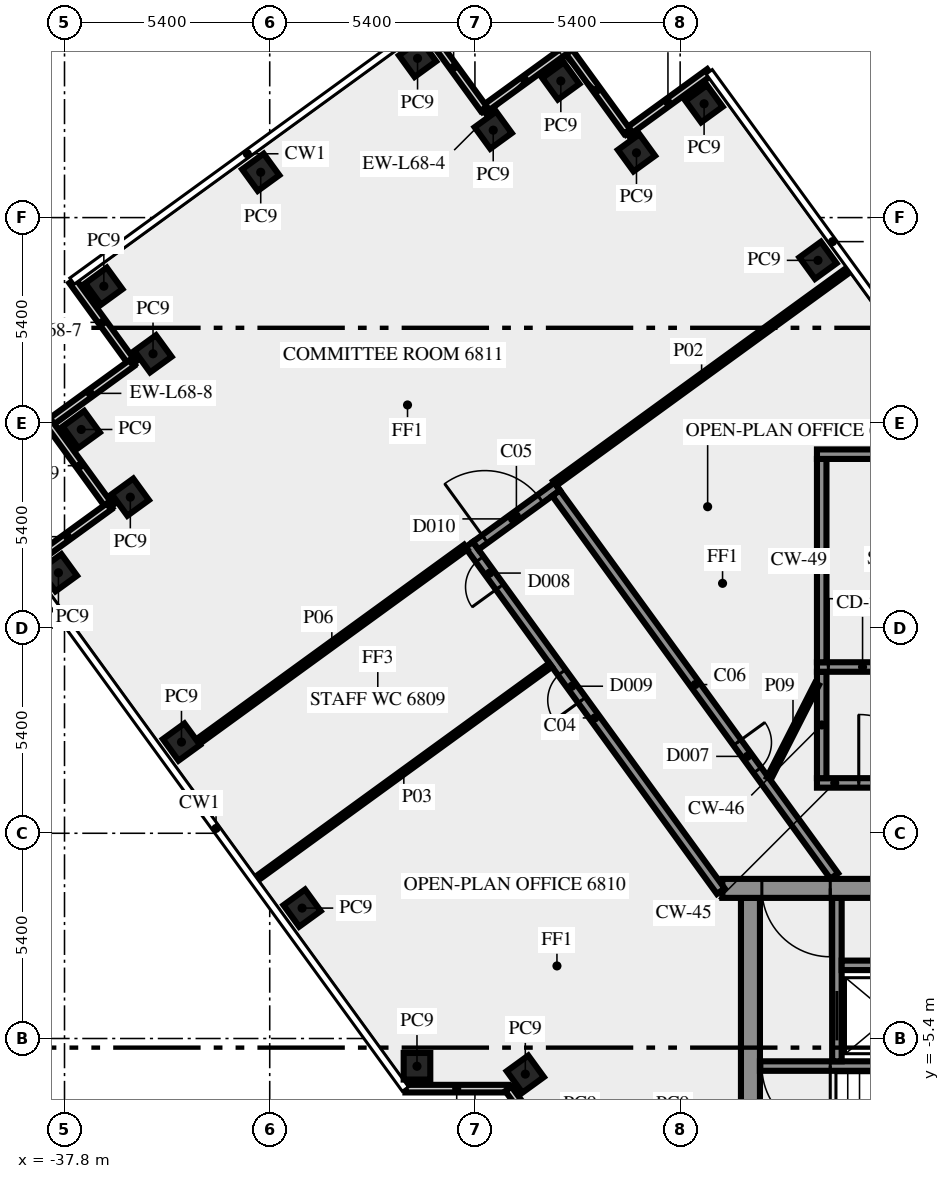
"""IFC4 building model, lengths in metres.
Left out: names, types, materials, properties, quantities, classifications, styles, units other than length and angle.
Written with IfcOpenShell. Run it as: python <this file> out.ifc"""

import sys

from ifc_helpers import new_model, si_unit, direction, frame, frame_2d, origin, origin_2d, place, context, subcontext, project, spatial, rectangle, extrude, element, fill, save


model = new_model("IFC4")
c1 = context("Model", 3, precision=1e-05, world=origin(), true_north=direction((0.0, 1.0)))
c2 = subcontext(c1, "Body", "Model", "MODEL_VIEW")
j1 = project(units=[si_unit("LENGTHUNIT", "METRE"), si_unit("PLANEANGLEUNIT", "RADIAN")], contexts=[c1])
p1 = place(None, origin())
s1 = spatial("IfcSite", under=j1, at=p1, CompositionType="ELEMENT")
p2 = place(p1, origin())
s2 = spatial("IfcBuilding", under=s1, at=p2, CompositionType="ELEMENT")
p3 = place(p2, frame((0.0, 0.0, 293.0)))
s3 = spatial("IfcBuildingStorey", under=s2, at=p3, CompositionType="ELEMENT", Elevation=293.0)
for number, where, z_axis, x_axis in (
    (1, (-17.974, 15.075, 0.0), (0.0, 0.0, 1.0), (-0.588, 0.809, 0.0)),
    (2, (-20.97, 19.195, 0.0), (0.0, 0.0, 1.0), (-0.588, 0.809, 0.0)),
    (3, (-22.749, 17.904, 0.0), (0.0, 0.0, 1.0), (-0.588, 0.809, 0.0)),
    (4, (-24.74, 19.795, 0.0), (0.0, 0.0, 1.0), (-0.588, 0.809, 0.0)),
    (5, (-26.519, 18.5, 0.0), (0.0, 0.0, 1.0), (-0.588, 0.809, 0.0)),
    (6, (-28.51, 20.39, 0.0), (0.0, 0.0, 1.0), (-0.809, -0.588, 0.0)),
    (7, (-32.637, 17.393, 0.0), (0.0, 0.0, 1.0), (-0.809, -0.588, 0.0)),
    (8, (-36.765, 14.395, 0.0), (0.0, 0.0, 1.0), (0.588, -0.809, 0.0)),
    (9, (-35.471, 12.616, 0.0), (0.0, 0.0, 1.0), (-0.809, -0.588, 0.0)),
    (10, (-37.36, 10.625, 0.0), (0.0, 0.0, 1.0), (0.588, -0.809, 0.0)),
    (11, (-36.068, 8.844, 0.0), (0.0, 0.0, 1.0), (0.588, -0.809, 0.0)),
    (12, (-37.96, 6.855, 0.0), (0.0, 0.0, 1.0), (0.588, -0.809, 0.0)),
    (13, (-34.722, 2.4, 0.0), (0.0, 0.0, 1.0), (0.588, -0.809, 0.0)),
    (14, (-31.548, -1.969, 0.0), (0.0, 0.0, 1.0), (0.588, -0.809, 0.0)),
    (15, (-28.525, -6.13, 0.0), (0.0, 0.0, 1.0), (1.0, 0.0, 0.0)),
    (16, (-25.674, -6.337, 0.0), (0.0, 0.0, 1.0), (0.588, -0.809, 0.0)),
):
    element("IfcColumn", number, at=place(p3, frame(where, z_axis=z_axis, x_axis=x_axis)), inside=s3, PredefinedType="COLUMN", context=c2, shape_type="SweptSolid", body=[
        extrude(rectangle(XDim=0.7, YDim=0.7, at=origin_2d()), origin(), (0.0, 0.0, 1.0), 3.65),
    ])
for number, where, z_axis, x_axis in (
    (17, (-20.829, 20.025, 0.0), (0.0, 0.0, 1.0), (-0.809, -0.588, 0.0)),
    (18, (-22.996, 18.466, 0.0), (0.0, 0.0, 1.0), (-0.588, 0.809, 0.0)),
):
    element("IfcWall", number, at=place(p3, frame(where, z_axis=z_axis, x_axis=x_axis)), inside=s3, PredefinedType="SOLIDWALL", context=c2, shape_type="SweptSolid", body=[
        extrude(rectangle(XDim=2.7, YDim=0.2, at=frame_2d((1.35, 0.0))), origin(), (0.0, 0.0, 1.0), 3.65),
    ])
for number, where, z_axis, x_axis in (
    (19, (-24.6, 20.623, 0.0), (0.0, 0.0, 1.0), (-0.809, -0.588, 0.0)),
    (20, (-26.768, 19.063, 0.0), (0.0, 0.0, 1.0), (-0.588, 0.809, 0.0)),
):
    element("IfcWall", number, at=place(p3, frame(where, z_axis=z_axis, x_axis=x_axis)), inside=s3, PredefinedType="SOLIDWALL", context=c2, shape_type="SweptSolid", body=[
        extrude(rectangle(XDim=2.7, YDim=0.2, at=frame_2d((1.35, 0.0))), origin(), (0.0, 0.0, 1.0), 3.65),
    ])
for number, where, z_axis, x_axis in (
    (21, (-37.592, 14.536, 0.0), (0.0, 0.0, 1.0), (0.588, -0.809, 0.0)),
    (22, (-36.032, 12.369, 0.0), (0.0, 0.0, 1.0), (-0.809, -0.588, 0.0)),
    (23, (-38.189, 10.765, 0.0), (0.0, 0.0, 1.0), (0.588, -0.809, 0.0)),
    (24, (-36.629, 8.597, 0.0), (0.0, 0.0, 1.0), (-0.809, -0.588, 0.0)),
    (25, (-28.83, -6.719, 0.0), (0.0, 0.0, 1.0), (1.0, 0.0, 0.0)),
):
    element("IfcWall", number, at=place(p3, frame(where, z_axis=z_axis, x_axis=x_axis)), inside=s3, PredefinedType="SOLIDWALL", context=c2, shape_type="SweptSolid", body=[
        extrude(rectangle(XDim=2.7, YDim=0.2, at=frame_2d((1.35, 0.0))), origin(), (0.0, 0.0, 1.0), 3.65),
    ])
p4 = place(p3, frame((-26.12, -6.724, 0.0), z_axis=(0.0, 0.0, 1.0), x_axis=(0.587720002413, -0.809064397168, 0.0)))
e26 = element("IfcWall", 26, at=p4, inside=s3, PredefinedType="SOLIDWALL", context=c2, shape_type="SweptSolid", body=[
    extrude(rectangle(XDim=2.7, YDim=0.2, at=frame_2d((1.35, 0.0))), origin(), (0.0, 0.0, 1.0), 3.65),
])
p5 = place(p3, frame((-19.75, -10.5, 0.0), z_axis=(0.0, 0.0, 1.0), x_axis=(0.0, 1.0, 0.0)))
e27 = element("IfcWall", 27, at=p5, inside=s3, PredefinedType="SHEAR", context=c2, shape_type="SweptSolid", body=[
    extrude(rectangle(XDim=8.8, YDim=0.5, at=frame_2d((4.4, 0.0))), origin(), (0.0, 0.0, 1.0), 3.65),
])
p6 = place(p3, frame((-11.45, -6.125, 0.0), z_axis=(0.0, 0.0, 1.0), x_axis=(-1.0, 0.0, 0.0)))
e28 = element("IfcWall", 28, at=p6, inside=s3, PredefinedType="SHEAR", context=c2, shape_type="SweptSolid", body=[
    extrude(rectangle(XDim=8.05, YDim=0.25, at=frame_2d((4.025, 0.0))), origin(), (0.0, 0.0, 1.0), 3.65),
])
p7 = place(p6, frame((6.2, 0.0, 0.0)))
e29 = element("IfcOpeningElement", 29, at=p7, cuts=e28, PredefinedType="OPENING", context=c2, shape_type="SweptSolid", body=[
    extrude(rectangle(XDim=1.8, YDim=2.1, at=frame_2d((0.9, 1.05))), frame((0.0, 0.135, 0.0), z_axis=(0.0, -1.0, 0.0), x_axis=(1.0, 0.0, 0.0)), (0.0, 0.0, 1.0), 0.27),
])
p8 = place(p3, frame((-17.475, -6.0, 0.0), z_axis=(0.0, 0.0, 1.0), x_axis=(0.0, 1.0, 0.0)))
e30 = element("IfcWall", 30, at=p8, inside=s3, PredefinedType="SHEAR", context=c2, shape_type="SweptSolid", body=[
    extrude(rectangle(XDim=4.3, YDim=0.25, at=frame_2d((2.15, 0.0))), origin(), (0.0, 0.0, 1.0), 3.65),
])
p9 = place(p8, frame((0.55, 0.0, 0.0)))
e31 = element("IfcOpeningElement", 31, at=p9, cuts=e30, PredefinedType="OPENING", context=c2, shape_type="SweptSolid", body=[
    extrude(rectangle(XDim=1.3, YDim=2.1, at=frame_2d((0.65, 1.05))), frame((0.0, 0.135, 0.0), z_axis=(0.0, -1.0, 0.0), x_axis=(1.0, 0.0, 0.0)), (0.0, 0.0, 1.0), 0.27),
])
p10 = place(p3, frame((-17.35, -3.475, 0.0), z_axis=(0.0, 0.0, 1.0), x_axis=(1.0, 0.0, 0.0)))
e32 = element("IfcWall", 32, at=p10, inside=s3, PredefinedType="SHEAR", context=c2, shape_type="SweptSolid", body=[
    extrude(rectangle(XDim=3.0, YDim=0.25, at=frame_2d((1.5, 0.0))), origin(), (0.0, 0.0, 1.0), 3.65),
])
p11 = place(p3, frame((20.49, -1.45, 0.0), z_axis=(0.0, 0.0, 1.0), x_axis=(-1.0, 0.0, 0.0)))
e33 = element("IfcWall", 33, at=p11, inside=s3, PredefinedType="SHEAR", context=c2, shape_type="SweptSolid", body=[
    extrude(rectangle(XDim=40.98, YDim=0.5, at=frame_2d((20.49, 0.0))), origin(), (0.0, 0.0, 1.0), 3.65),
])
p12 = place(p11, frame((38.14, 0.0, 0.0)))
e34 = element("IfcOpeningElement", 34, at=p12, cuts=e33, PredefinedType="OPENING", context=c2, shape_type="SweptSolid", body=[
    extrude(rectangle(XDim=1.8, YDim=2.1, at=frame_2d((0.9, 1.05))), frame((0.0, 0.26, 0.0), z_axis=(0.0, -1.0, 0.0), x_axis=(1.0, 0.0, 0.0)), (0.0, 0.0, 1.0), 0.52),
])
p13 = place(p11, frame((35.89, 0.0, 0.0)))
e35 = element("IfcOpeningElement", 35, at=p13, cuts=e33, PredefinedType="OPENING", context=c2, shape_type="SweptSolid", body=[
    extrude(rectangle(XDim=0.9, YDim=2.1, at=frame_2d((0.45, 1.05))), frame((0.0, 0.26, 0.0), z_axis=(0.0, -1.0, 0.0), x_axis=(1.0, 0.0, 0.0)), (0.0, 0.0, 1.0), 0.52),
])
p14 = place(p11, frame((32.94, 0.0, 0.0)))
e36 = element("IfcOpeningElement", 36, at=p14, cuts=e33, PredefinedType="OPENING", context=c2, shape_type="SweptSolid", body=[
    extrude(rectangle(XDim=0.9, YDim=2.1, at=frame_2d((0.45, 1.05))), frame((0.0, 0.26, 0.0), z_axis=(0.0, -1.0, 0.0), x_axis=(1.0, 0.0, 0.0)), (0.0, 0.0, 1.0), 0.52),
])
p15 = place(p11, frame((31.015, 0.0, 0.0)))
e37 = element("IfcOpeningElement", 37, at=p15, cuts=e33, PredefinedType="OPENING", context=c2, shape_type="SweptSolid", body=[
    extrude(rectangle(XDim=0.8, YDim=2.1, at=frame_2d((0.4, 1.05))), frame((0.0, 0.26, 0.0), z_axis=(0.0, -1.0, 0.0), x_axis=(1.0, 0.0, 0.0)), (0.0, 0.0, 1.0), 0.52),
])
p16 = place(p11, frame((24.765, 0.0, 0.0)))
e38 = element("IfcOpeningElement", 38, at=p16, cuts=e33, PredefinedType="OPENING", context=c2, shape_type="SweptSolid", body=[
    extrude(rectangle(XDim=0.8, YDim=2.1, at=frame_2d((0.4, 1.05))), frame((0.0, 0.26, 0.0), z_axis=(0.0, -1.0, 0.0), x_axis=(1.0, 0.0, 0.0)), (0.0, 0.0, 1.0), 0.52),
])
p17 = place(p11, frame((21.765, 0.0, 0.0)))
e39 = element("IfcOpeningElement", 39, at=p17, cuts=e33, PredefinedType="OPENING", context=c2, shape_type="SweptSolid", body=[
    extrude(rectangle(XDim=2.0, YDim=2.1, at=frame_2d((1.0, 1.05))), frame((0.0, 0.26, 0.0), z_axis=(0.0, -1.0, 0.0), x_axis=(1.0, 0.0, 0.0)), (0.0, 0.0, 1.0), 0.52),
])
p18 = place(p11, frame((15.202, 0.0, 0.0)))
e40 = element("IfcOpeningElement", 40, at=p18, cuts=e33, PredefinedType="OPENING", context=c2, shape_type="SweptSolid", body=[
    extrude(rectangle(XDim=0.9, YDim=2.1, at=frame_2d((0.45, 1.05))), frame((0.0, 0.26, 0.0), z_axis=(0.0, -1.0, 0.0), x_axis=(1.0, 0.0, 0.0)), (0.0, 0.0, 1.0), 0.52),
])
p19 = place(p11, frame((13.54, 0.0, 0.0)))
e41 = element("IfcOpeningElement", 41, at=p19, cuts=e33, PredefinedType="OPENING", context=c2, shape_type="SweptSolid", body=[
    extrude(rectangle(XDim=0.9, YDim=2.1, at=frame_2d((0.45, 1.05))), frame((0.0, 0.26, 0.0), z_axis=(0.0, -1.0, 0.0), x_axis=(1.0, 0.0, 0.0)), (0.0, 0.0, 1.0), 0.52),
])
p20 = place(p11, frame((11.64, 0.0, 0.0)))
e42 = element("IfcOpeningElement", 42, at=p20, cuts=e33, PredefinedType="OPENING", context=c2, shape_type="SweptSolid", body=[
    extrude(rectangle(XDim=0.9, YDim=2.1, at=frame_2d((0.45, 1.05))), frame((0.0, 0.26, 0.0), z_axis=(0.0, -1.0, 0.0), x_axis=(1.0, 0.0, 0.0)), (0.0, 0.0, 1.0), 0.52),
])
p21 = place(p11, frame((9.577, 0.0, 0.0)))
e43 = element("IfcOpeningElement", 43, at=p21, cuts=e33, PredefinedType="OPENING", context=c2, shape_type="SweptSolid", body=[
    extrude(rectangle(XDim=0.9, YDim=2.1, at=frame_2d((0.45, 1.05))), frame((0.0, 0.26, 0.0), z_axis=(0.0, -1.0, 0.0), x_axis=(1.0, 0.0, 0.0)), (0.0, 0.0, 1.0), 0.52),
])
p22 = place(p11, frame((7.14, 0.0, 0.0)))
e44 = element("IfcOpeningElement", 44, at=p22, cuts=e33, PredefinedType="OPENING", context=c2, shape_type="SweptSolid", body=[
    extrude(rectangle(XDim=0.9, YDim=2.1, at=frame_2d((0.45, 1.05))), frame((0.0, 0.26, 0.0), z_axis=(0.0, -1.0, 0.0), x_axis=(1.0, 0.0, 0.0)), (0.0, 0.0, 1.0), 0.52),
])
p23 = place(p11, frame((5.028, 0.0, 0.0)))
e45 = element("IfcOpeningElement", 45, at=p23, cuts=e33, PredefinedType="OPENING", context=c2, shape_type="SweptSolid", body=[
    extrude(rectangle(XDim=0.8, YDim=2.1, at=frame_2d((0.4, 1.05))), frame((0.0, 0.26, 0.0), z_axis=(0.0, -1.0, 0.0), x_axis=(1.0, 0.0, 0.0)), (0.0, 0.0, 1.0), 0.52),
])
p24 = place(p11, frame((3.452, 0.0, 0.0)))
e46 = element("IfcOpeningElement", 46, at=p24, cuts=e33, PredefinedType="OPENING", context=c2, shape_type="SweptSolid", body=[
    extrude(rectangle(XDim=0.8, YDim=2.1, at=frame_2d((0.4, 1.05))), frame((0.0, 0.26, 0.0), z_axis=(0.0, -1.0, 0.0), x_axis=(1.0, 0.0, 0.0)), (0.0, 0.0, 1.0), 0.52),
])
p25 = place(p11, frame((1.04, 0.0, 0.0)))
e47 = element("IfcOpeningElement", 47, at=p25, cuts=e33, PredefinedType="OPENING", context=c2, shape_type="SweptSolid", body=[
    extrude(rectangle(XDim=1.8, YDim=2.1, at=frame_2d((0.9, 1.05))), frame((0.0, 0.26, 0.0), z_axis=(0.0, -1.0, 0.0), x_axis=(1.0, 0.0, 0.0)), (0.0, 0.0, 1.0), 0.52),
])
p26 = place(p3, frame((-18.0, 1.325, 0.0), z_axis=(0.0, 0.0, 1.0), x_axis=(1.0, 0.0, 0.0)))
e48 = element("IfcWall", 48, at=p26, inside=s3, PredefinedType="SHEAR", context=c2, shape_type="SweptSolid", body=[
    extrude(rectangle(XDim=3.9, YDim=0.25, at=frame_2d((1.95, 0.0))), origin(), (0.0, 0.0, 1.0), 3.65),
])
p27 = place(p26, frame((1.1, 0.0, 0.0)))
e49 = element("IfcOpeningElement", 49, at=p27, cuts=e48, PredefinedType="OPENING", context=c2, shape_type="SweptSolid", body=[
    extrude(rectangle(XDim=1.8, YDim=2.1, at=frame_2d((0.9, 1.05))), frame((0.0, 0.135, 0.0), z_axis=(0.0, -1.0, 0.0), x_axis=(1.0, 0.0, 0.0)), (0.0, 0.0, 1.0), 0.27),
])
p28 = place(p3, frame((-17.875, 1.45, 0.0), z_axis=(0.0, 0.0, 1.0), x_axis=(0.0, 1.0, 0.0)))
e50 = element("IfcWall", 50, at=p28, inside=s3, PredefinedType="SHEAR", context=c2, shape_type="SweptSolid", body=[
    extrude(rectangle(XDim=2.8, YDim=0.25, at=frame_2d((1.4, 0.0))), origin(), (0.0, 0.0, 1.0), 3.65),
])
p29 = place(p3, frame((-18.0, 4.375, 0.0), z_axis=(0.0, 0.0, 1.0), x_axis=(1.0, 0.0, 0.0)))
e51 = element("IfcWall", 51, at=p29, inside=s3, PredefinedType="SHEAR", context=c2, shape_type="SweptSolid", body=[
    extrude(rectangle(XDim=10.5, YDim=0.25, at=frame_2d((5.25, 0.0))), origin(), (0.0, 0.0, 1.0), 3.65),
])
p30 = place(p29, frame((0.3, 0.0, 0.0)))
e52 = element("IfcOpeningElement", 52, at=p30, cuts=e51, PredefinedType="OPENING", context=c2, shape_type="SweptSolid", body=[
    extrude(rectangle(XDim=1.8, YDim=2.1, at=frame_2d((0.9, 1.05))), frame((0.0, 0.135, 0.0), z_axis=(0.0, -1.0, 0.0), x_axis=(1.0, 0.0, 0.0)), (0.0, 0.0, 1.0), 0.27),
])
p31 = place(p3, frame((-17.875, 4.5, 0.0), z_axis=(0.0, 0.0, 1.0), x_axis=(0.0, 1.0, 0.0)))
e53 = element("IfcWall", 53, at=p31, inside=s3, PredefinedType="SHEAR", context=c2, shape_type="SweptSolid", body=[
    extrude(rectangle(XDim=5.35, YDim=0.25, at=frame_2d((2.675, 0.0))), origin(), (0.0, 0.0, 1.0), 3.65),
])
p32 = place(p3, frame((-18.0, 9.975, 0.0), z_axis=(0.0, 0.0, 1.0), x_axis=(1.0, 0.0, 0.0)))
e54 = element("IfcWall", 54, at=p32, inside=s3, PredefinedType="SHEAR", context=c2, shape_type="SweptSolid", body=[
    extrude(rectangle(XDim=10.5, YDim=0.25, at=frame_2d((5.25, 0.0))), origin(), (0.0, 0.0, 1.0), 3.65),
])
p33 = place(p32, frame((4.5, 0.0, 1.0)))
e55 = element("IfcOpeningElement", 55, at=p33, cuts=e54, PredefinedType="OPENING", context=c2, shape_type="SweptSolid", body=[
    extrude(rectangle(XDim=1.2, YDim=1.2, at=frame_2d((0.6, 0.6))), frame((0.0, 0.135, 0.0), z_axis=(0.0, -1.0, 0.0), x_axis=(1.0, 0.0, 0.0)), (0.0, 0.0, 1.0), 0.27),
])
p34 = place(p3, frame((-20.531, -1.523, 0.0), z_axis=(0.0, 0.0, 1.0), x_axis=(-0.587782646447, 0.809018887626, 0.0)))
e56 = element("IfcWall", 56, at=p34, inside=s3, PredefinedType="SOLIDWALL", context=c2, shape_type="SweptSolid", body=[
    extrude(rectangle(XDim=11.27, YDim=0.25, at=frame_2d((5.635, 0.0))), origin(), (0.0, 0.0, 1.0), 3.65),
])
p35 = place(p34, frame((6.216, 0.0, 0.0)))
e57 = element("IfcOpeningElement", 57, at=p35, cuts=e56, PredefinedType="OPENING", context=c2, shape_type="SweptSolid", body=[
    extrude(rectangle(XDim=0.9, YDim=2.1, at=frame_2d((0.45, 1.05))), frame((0.0, 0.135, 0.0), z_axis=(0.0, -1.0, 0.0), x_axis=(1.0, 0.0, 0.0)), (0.0, 0.0, 1.0), 0.27),
])
p36 = place(p34, frame((9.896, 0.0, 0.0)))
e58 = element("IfcOpeningElement", 58, at=p36, cuts=e56, PredefinedType="OPENING", context=c2, shape_type="SweptSolid", body=[
    extrude(rectangle(XDim=0.9, YDim=2.1, at=frame_2d((0.45, 1.05))), frame((0.0, 0.135, 0.0), z_axis=(0.0, -1.0, 0.0), x_axis=(1.0, 0.0, 0.0)), (0.0, 0.0, 1.0), 0.27),
])
p37 = place(p3, frame((-26.981, 7.567, 0.0), z_axis=(0.0, 0.0, 1.0), x_axis=(0.809038743598, 0.587755315891, 0.0)))
e59 = element("IfcWall", 59, at=p37, inside=s3, PredefinedType="SOLIDWALL", context=c2, shape_type="SweptSolid", body=[
    extrude(rectangle(XDim=2.65, YDim=0.25, at=frame_2d((1.325, 0.0))), origin(), (0.0, 0.0, 1.0), 3.65),
])
p38 = place(p37, frame((0.3, 0.0, 0.0)))
e60 = element("IfcOpeningElement", 60, at=p38, cuts=e59, PredefinedType="OPENING", context=c2, shape_type="SweptSolid", body=[
    extrude(rectangle(XDim=1.8, YDim=2.1, at=frame_2d((0.9, 1.05))), frame((0.0, 0.135, 0.0), z_axis=(0.0, -1.0, 0.0), x_axis=(1.0, 0.0, 0.0)), (0.0, 0.0, 1.0), 0.27),
])
p39 = place(p3, frame((-24.865, 8.95, 0.0), z_axis=(0.0, 0.0, 1.0), x_axis=(0.587791617212, -0.809012369952, 0.0)))
e61 = element("IfcWall", 61, at=p39, inside=s3, PredefinedType="SOLIDWALL", context=c2, shape_type="SweptSolid", body=[
    extrude(rectangle(XDim=12.453, YDim=0.25, at=frame_2d((6.227, 0.0))), origin(), (0.0, 0.0, 1.0), 3.65),
])
p40 = place(p39, frame((8.112, 0.0, 0.0)))
e62 = element("IfcOpeningElement", 62, at=p40, cuts=e61, PredefinedType="OPENING", context=c2, shape_type="SweptSolid", body=[
    extrude(rectangle(XDim=0.9, YDim=2.1, at=frame_2d((0.45, 1.05))), frame((0.0, 0.135, 0.0), z_axis=(0.0, -1.0, 0.0), x_axis=(1.0, 0.0, 0.0)), (0.0, 0.0, 1.0), 0.27),
])
p41 = place(p3, frame((-17.172, 14.823, 0.0), z_axis=(0.0, 0.0, 1.0), x_axis=(-0.809013490065, -0.587790075531, 0.0)))
e63 = element("IfcWall", 63, at=p41, inside=s3, PredefinedType="PARTITIONING", context=c2, shape_type="SweptSolid", body=[
    extrude(rectangle(XDim=9.549, YDim=0.15, at=frame_2d((4.775, 0.0))), origin(), (0.0, 0.0, 1.0), 2.95),
])
p42 = place(p3, frame((-25.008, 4.427, 0.0), z_axis=(0.0, 0.0, 1.0), x_axis=(-0.808994684961, -0.587815957341, 0.0)))
e64 = element("IfcWall", 64, at=p42, inside=s3, PredefinedType="PARTITIONING", context=c2, shape_type="SweptSolid", body=[
    extrude(rectangle(XDim=9.55, YDim=0.12, at=frame_2d((4.775, 0.0))), origin(), (0.0, 0.0, 1.0), 2.95),
])
p43 = place(p3, frame((-34.291, 2.41, 0.0), z_axis=(0.0, 0.0, 1.0), x_axis=(0.809027940177, 0.587770186393, 0.0)))
e65 = element("IfcWall", 65, at=p43, inside=s3, PredefinedType="PARTITIONING", context=c2, shape_type="SweptSolid", body=[
    extrude(rectangle(XDim=8.715, YDim=0.15, at=frame_2d((4.357, 0.0))), origin(), (0.0, 0.0, 1.0), 3.65),
])
p44 = place(p3, frame((-19.261, 1.45, 0.0), z_axis=(0.0, 0.0, 1.0), x_axis=(0.453950796792, 0.891026752736, 0.0)))
e66 = element("IfcWall", 66, at=p44, inside=s3, PredefinedType="PARTITIONING", context=c2, shape_type="SweptSolid", body=[
    extrude(rectangle(XDim=2.778, YDim=0.12, at=frame_2d((1.389, 0.0))), origin(), (0.0, 0.0, 1.0), 3.65),
])
p45 = place(p7, origin())
e67 = element("IfcDoor", 67, at=p45, inside=s3, OperationType="DOUBLE_DOOR_SINGLE_SWING", PredefinedType="DOOR", context=c2, shape_type="SweptSolid", body=[
    extrude(rectangle(XDim=1.8, YDim=2.1, at=frame_2d((0.9, 1.05))), frame((0.0, 0.025, 0.0), z_axis=(0.0, -1.0, 0.0), x_axis=(1.0, 0.0, 0.0)), (0.0, 0.0, 1.0), 0.05),
])
fill(e29, e67)
p46 = place(p9, origin())
e68 = element("IfcDoor", 68, at=p46, inside=s3, OperationType="DOUBLE_DOOR_SLIDING", PredefinedType="DOOR", context=c2, shape_type="SweptSolid", body=[
    extrude(rectangle(XDim=1.3, YDim=2.1, at=frame_2d((0.65, 1.05))), frame((0.0, 0.025, 0.0), z_axis=(0.0, -1.0, 0.0), x_axis=(1.0, 0.0, 0.0)), (0.0, 0.0, 1.0), 0.05),
])
fill(e31, e68)
p47 = place(p12, origin())
e69 = element("IfcDoor", 69, at=p47, inside=s3, OperationType="DOUBLE_DOOR_SINGLE_SWING", PredefinedType="DOOR", context=c2, shape_type="SweptSolid", body=[
    extrude(rectangle(XDim=1.8, YDim=2.1, at=frame_2d((0.9, 1.05))), frame((0.0, 0.025, 0.0), z_axis=(0.0, -1.0, 0.0), x_axis=(1.0, 0.0, 0.0)), (0.0, 0.0, 1.0), 0.05),
])
fill(e34, e69)
p48 = place(p27, origin())
e70 = element("IfcDoor", 70, at=p48, inside=s3, OperationType="DOUBLE_DOOR_SINGLE_SWING", PredefinedType="DOOR", context=c2, shape_type="SweptSolid", body=[
    extrude(rectangle(XDim=1.8, YDim=2.1, at=frame_2d((0.9, 1.05))), frame((0.0, 0.025, 0.0), z_axis=(0.0, -1.0, 0.0), x_axis=(1.0, 0.0, 0.0)), (0.0, 0.0, 1.0), 0.05),
])
fill(e49, e70)
p49 = place(p30, origin())
e71 = element("IfcDoor", 71, at=p49, inside=s3, OperationType="DOUBLE_DOOR_SINGLE_SWING", PredefinedType="DOOR", context=c2, shape_type="SweptSolid", body=[
    extrude(rectangle(XDim=1.8, YDim=2.1, at=frame_2d((0.9, 1.05))), frame((0.0, 0.025, 0.0), z_axis=(0.0, -1.0, 0.0), x_axis=(1.0, 0.0, 0.0)), (0.0, 0.0, 1.0), 0.05),
])
fill(e52, e71)
p50 = place(p40, origin())
e72 = element("IfcDoor", 72, at=p50, inside=s3, OperationType="SINGLE_SWING_RIGHT", PredefinedType="DOOR", context=c2, shape_type="SweptSolid", body=[
    extrude(rectangle(XDim=0.9, YDim=2.1, at=frame_2d((0.45, 1.05))), frame((0.0, 0.025, 0.0), z_axis=(0.0, -1.0, 0.0), x_axis=(1.0, 0.0, 0.0)), (0.0, 0.0, 1.0), 0.05),
])
fill(e62, e72)
p51 = place(p35, origin())
e73 = element("IfcDoor", 73, at=p51, inside=s3, OperationType="SINGLE_SWING_RIGHT", PredefinedType="DOOR", context=c2, shape_type="SweptSolid", body=[
    extrude(rectangle(XDim=0.9, YDim=2.1, at=frame_2d((0.45, 1.05))), frame((0.0, 0.025, 0.0), z_axis=(0.0, -1.0, 0.0), x_axis=(1.0, 0.0, 0.0)), (0.0, 0.0, 1.0), 0.05),
])
fill(e57, e73)
p52 = place(p38, origin())
e74 = element("IfcDoor", 74, at=p52, inside=s3, OperationType="DOUBLE_DOOR_SINGLE_SWING", PredefinedType="DOOR", context=c2, shape_type="SweptSolid", body=[
    extrude(rectangle(XDim=1.8, YDim=2.1, at=frame_2d((0.9, 1.05))), frame((0.0, 0.025, 0.0), z_axis=(0.0, -1.0, 0.0), x_axis=(1.0, 0.0, 0.0)), (0.0, 0.0, 1.0), 0.05),
])
fill(e60, e74)
p53 = place(p36, origin())
e75 = element("IfcDoor", 75, at=p53, inside=s3, OperationType="SINGLE_SWING_RIGHT", PredefinedType="DOOR", context=c2, shape_type="SweptSolid", body=[
    extrude(rectangle(XDim=0.9, YDim=2.1, at=frame_2d((0.45, 1.05))), frame((0.0, 0.025, 0.0), z_axis=(0.0, -1.0, 0.0), x_axis=(1.0, 0.0, 0.0)), (0.0, 0.0, 1.0), 0.05),
])
fill(e58, e75)
save(model, sys.argv[1])
